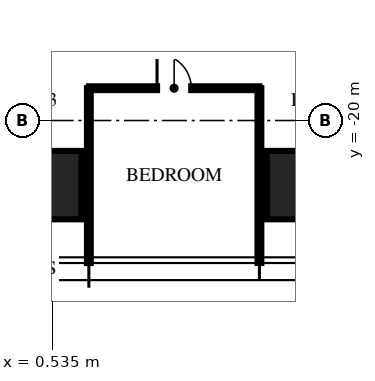
"""IFC4 building model, lengths in metres.
Left out: names, types, materials, properties, quantities, classifications, styles, units other than length and angle.
Written with IfcOpenShell. Run it as: python <this file> out.ifc"""

import sys

from ifc_helpers import new_model, si_unit, direction, frame, frame_2d, origin, origin_2d, place, context, subcontext, project, spatial, rectangle, extrude, element, fill, save


model = new_model("IFC4")
c1 = context("Model", 3, precision=1e-05, world=origin(), true_north=direction((0.0, 1.0)))
c2 = subcontext(c1, "Body", "Model", "MODEL_VIEW")
j1 = project(units=[si_unit("LENGTHUNIT", "METRE"), si_unit("PLANEANGLEUNIT", "RADIAN")], contexts=[c1])
p1 = place(None, origin())
s1 = spatial("IfcSite", under=j1, at=p1, CompositionType="ELEMENT")
p2 = place(p1, origin())
s2 = spatial("IfcBuilding", under=s1, at=p2, CompositionType="ELEMENT")
p3 = place(p2, frame((0.0, 0.0, 289.5)))
s3 = spatial("IfcBuildingStorey", under=s2, at=p3, CompositionType="ELEMENT", Elevation=289.5)
for number, where, z_axis, x_axis in (
    (1, (7.48, -21.7, 0.0), (0.0, 0.0, 1.0), (1.0, 0.0, 0.0)),
    (2, (0.0, -21.7, 0.0), (0.0, 0.0, 1.0), (1.0, 0.0, 0.0)),
):
    element("IfcColumn", number, at=place(p3, frame(where, z_axis=z_axis, x_axis=x_axis)), inside=s3, PredefinedType="COLUMN", context=c2, shape_type="SweptSolid", body=[
        extrude(rectangle(XDim=2.6, YDim=1.8, at=origin_2d()), origin(), (0.0, 0.0, 1.0), 3.75),
    ])
for number, where, z_axis, x_axis in (
    (3, (1.496, -19.15, 0.0), (0.0, 0.0, 1.0), (0.0, -1.0, 0.0)),
    (4, (5.984, -19.15, 0.0), (0.0, 0.0, 1.0), (0.0, -1.0, 0.0)),
):
    element("IfcWall", number, at=place(p3, frame(where, z_axis=z_axis, x_axis=x_axis)), inside=s3, PredefinedType="PARTITIONING", context=c2, shape_type="SweptSolid", body=[
        extrude(rectangle(XDim=4.6, YDim=0.1, at=frame_2d((2.3, 0.0))), origin(), (0.0, 0.0, 1.0), 3.01),
    ])
p4 = place(p3, frame((1.496, -19.15, 0.0), z_axis=(0.0, 0.0, 1.0), x_axis=(1.0, 0.0, 0.0)))
e5 = element("IfcWall", 5, at=p4, inside=s3, PredefinedType="PARTITIONING", context=c2, shape_type="SweptSolid", body=[
    extrude(rectangle(XDim=4.488, YDim=0.1, at=frame_2d((2.244, 0.0))), origin(), (0.0, 0.0, 1.0), 2.91),
])
p5 = place(p4, frame((1.794, 0.0, 0.0)))
e6 = element("IfcOpeningElement", 6, at=p5, cuts=e5, PredefinedType="OPENING", context=c2, shape_type="SweptSolid", body=[
    extrude(rectangle(XDim=0.9, YDim=2.1, at=frame_2d((0.45, 1.05))), frame((0.0, 0.06, 0.0), z_axis=(0.0, -1.0, 0.0), x_axis=(1.0, 0.0, 0.0)), (0.0, 0.0, 1.0), 0.12),
])
p6 = place(p5, origin())
e7 = element("IfcDoor", 7, at=p6, inside=s3, OperationType="SINGLE_SWING_LEFT", PredefinedType="DOOR", context=c2, shape_type="SweptSolid", body=[
    extrude(rectangle(XDim=0.9, YDim=2.1, at=frame_2d((0.45, 1.05))), frame((0.0, 0.025, 0.0), z_axis=(0.0, -1.0, 0.0), x_axis=(1.0, 0.0, 0.0)), (0.0, 0.0, 1.0), 0.05),
])
fill(e6, e7)
save(model, sys.argv[1])
